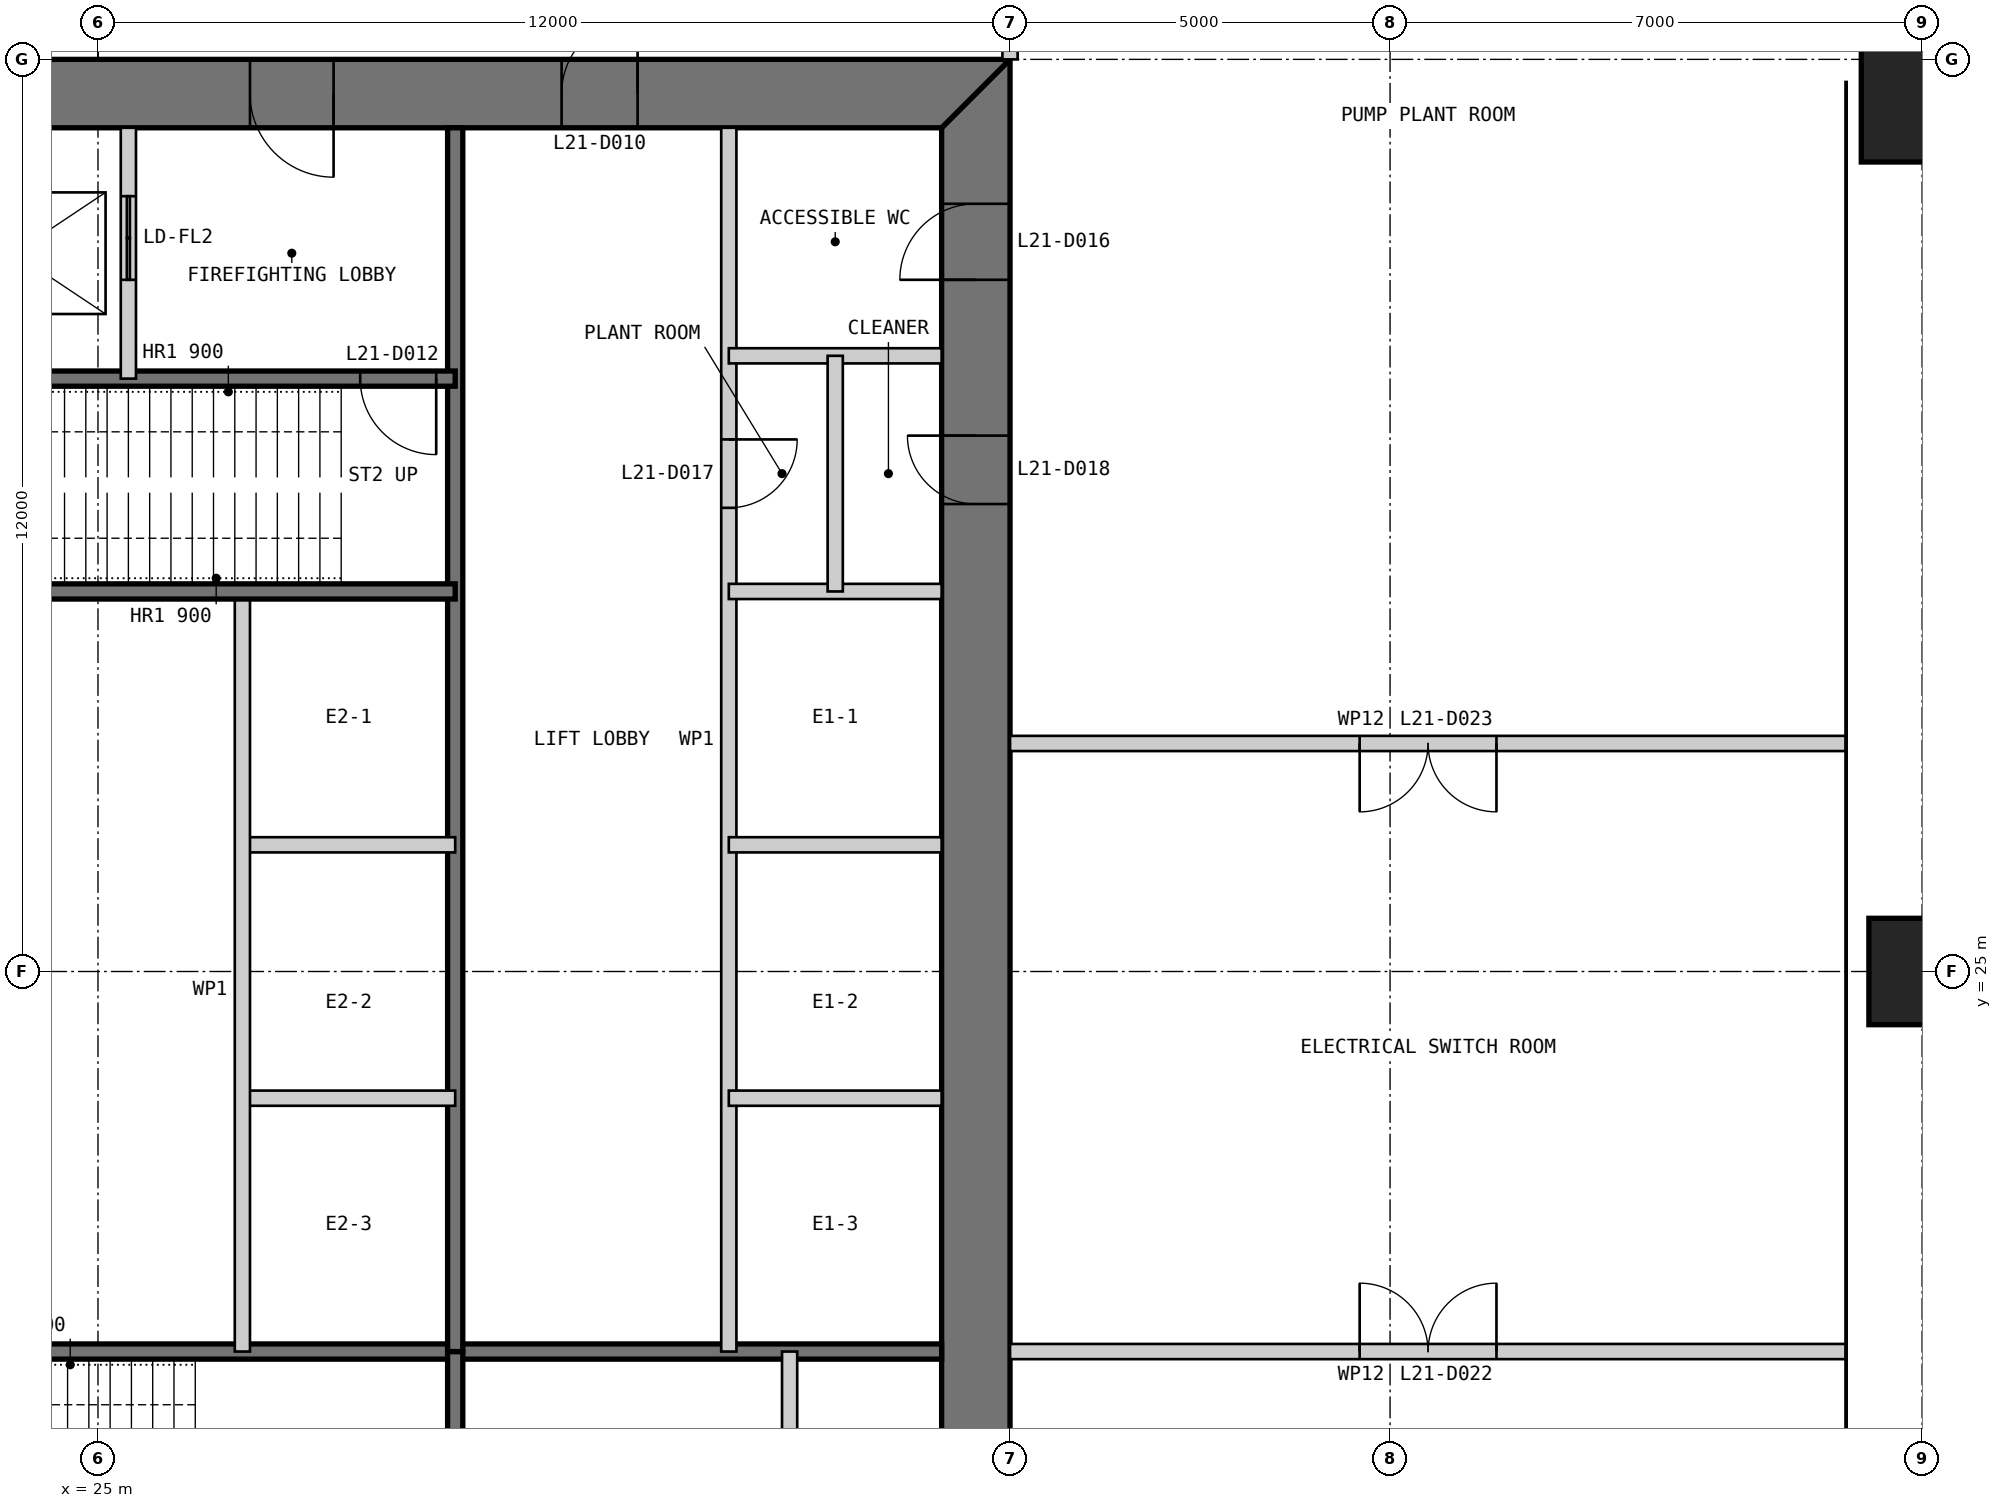
"""IFC4 building model, lengths in metres.
Left out: names, types, materials, properties, quantities, classifications, styles, units other than length and angle.
Written with IfcOpenShell. Run it as: python <this file> out.ifc"""

import sys

from ifc_helpers import new_model, si_unit, direction, frame, frame_2d, origin, origin_2d, place, context, subcontext, project, spatial, polyline, rectangle, outline, extrude, element, fill, save


model = new_model("IFC4")
c1 = context("Model", 3, precision=1e-05, world=origin(), true_north=direction((0.0, 1.0)))
c2 = subcontext(c1, "Body", "Model", "MODEL_VIEW")
j1 = project(units=[si_unit("LENGTHUNIT", "METRE"), si_unit("PLANEANGLEUNIT", "RADIAN")], contexts=[c1])
p1 = place(None, origin())
s1 = spatial("IfcSite", under=j1, at=p1, CompositionType="ELEMENT")
p2 = place(p1, origin())
s2 = spatial("IfcBuilding", under=s1, at=p2, CompositionType="ELEMENT")
p3 = place(p2, frame((0.0, 0.0, 91.0)))
s3 = spatial("IfcBuildingStorey", under=s2, at=p3, CompositionType="ELEMENT", Elevation=91.0)
p4 = place(p3, frame((49.0, 25.0, 0.0), z_axis=(0.0, 0.0, 1.0), x_axis=(1.0, 0.0, 0.0)))
e1 = element("IfcColumn", 1, at=p4, inside=s3, PredefinedType="COLUMN", context=c2, shape_type="SweptSolid", body=[
    extrude(rectangle(XDim=1.4, YDim=1.4, at=origin_2d()), origin(), (0.0, 0.0, 1.0), 6.0),
])
p5 = place(p3, frame((49.0, 37.0, 0.0), z_axis=(0.0, 0.0, 1.0), x_axis=(1.0, 0.0, 0.0)))
e2 = element("IfcColumn", 2, at=p5, inside=s3, PredefinedType="COLUMN", context=c2, shape_type="SweptSolid", body=[
    extrude(rectangle(XDim=1.6, YDim=2.7, at=origin_2d()), origin(), (0.0, 0.0, 1.0), 6.0),
])
p6 = place(p3, frame((36.55, 13.9, 0.0), z_axis=(0.0, 0.0, 1.0), x_axis=(0.0, 1.0, 0.0)))
e3 = element("IfcWall", 3, at=p6, inside=s3, PredefinedType="SHEAR", context=c2, shape_type="SweptSolid", body=[
    extrude(outline(polyline([(-0.9, -0.45), (23.1, -0.45), (22.2, 0.45), (0.0, 0.45), (-0.9, -0.45)])), origin(), (0.0, 0.0, 1.0), 6.0),
])
p7 = place(p6, frame((20.2, 0.0, 0.0)))
e4 = element("IfcOpeningElement", 4, at=p7, cuts=e3, PredefinedType="OPENING", context=c2, shape_type="SweptSolid", body=[
    extrude(rectangle(XDim=1.0, YDim=2.2, at=frame_2d((0.5, 1.1))), frame((0.0, 0.46, 0.0), z_axis=(0.0, -1.0, 0.0), x_axis=(1.0, 0.0, 0.0)), (0.0, 0.0, 1.0), 0.92),
])
p8 = place(p6, frame((17.25, 0.0, 0.0)))
e5 = element("IfcOpeningElement", 5, at=p8, cuts=e3, PredefinedType="OPENING", context=c2, shape_type="SweptSolid", body=[
    extrude(rectangle(XDim=0.9, YDim=2.2, at=frame_2d((0.45, 1.1))), frame((0.0, 0.46, 0.0), z_axis=(0.0, -1.0, 0.0), x_axis=(1.0, 0.0, 0.0)), (0.0, 0.0, 1.0), 0.92),
])
p9 = place(p3, frame((37.0, 36.55, 0.0), z_axis=(0.0, 0.0, 1.0), x_axis=(-1.0, 0.0, 0.0)))
e6 = element("IfcWall", 6, at=p9, inside=s3, PredefinedType="SHEAR", context=c2, shape_type="SweptSolid", body=[
    extrude(outline(polyline([(0.0, -0.45), (24.0, -0.45), (23.1, 0.45), (0.9, 0.45), (0.0, -0.45)])), origin(), (0.0, 0.0, 1.0), 6.0),
])
p10 = place(p9, frame((4.9, 0.0, 0.0)))
e7 = element("IfcOpeningElement", 7, at=p10, cuts=e6, PredefinedType="OPENING", context=c2, shape_type="SweptSolid", body=[
    extrude(rectangle(XDim=1.0, YDim=2.2, at=frame_2d((0.5, 1.1))), frame((0.0, 0.46, 0.0), z_axis=(0.0, -1.0, 0.0), x_axis=(1.0, 0.0, 0.0)), (0.0, 0.0, 1.0), 0.92),
])
p11 = place(p9, frame((8.9, 0.0, 0.0)))
e8 = element("IfcOpeningElement", 8, at=p11, cuts=e6, PredefinedType="OPENING", context=c2, shape_type="SweptSolid", body=[
    extrude(rectangle(XDim=1.1, YDim=2.2, at=frame_2d((0.55, 1.1))), frame((0.0, 0.46, 0.0), z_axis=(0.0, -1.0, 0.0), x_axis=(1.0, 0.0, 0.0)), (0.0, 0.0, 1.0), 0.92),
])
p12 = place(p9, frame((15.05, 0.0, 0.0)))
e9 = element("IfcOpeningElement", 9, at=p12, cuts=e6, PredefinedType="OPENING", context=c2, shape_type="SweptSolid", body=[
    extrude(rectangle(XDim=0.9, YDim=2.2, at=frame_2d((0.45, 1.1))), frame((0.0, 0.46, 0.0), z_axis=(0.0, -1.0, 0.0), x_axis=(1.0, 0.0, 0.0)), (0.0, 0.0, 1.0), 0.92),
])
p13 = place(p9, frame((17.9, 0.0, 0.0)))
e10 = element("IfcOpeningElement", 10, at=p13, cuts=e6, PredefinedType="OPENING", context=c2, shape_type="SweptSolid", body=[
    extrude(rectangle(XDim=1.0, YDim=2.2, at=frame_2d((0.5, 1.1))), frame((0.0, 0.46, 0.0), z_axis=(0.0, -1.0, 0.0), x_axis=(1.0, 0.0, 0.0)), (0.0, 0.0, 1.0), 0.92),
])
p14 = place(p9, frame((21.4, 0.0, 0.0)))
e11 = element("IfcOpeningElement", 11, at=p14, cuts=e6, PredefinedType="OPENING", context=c2, shape_type="SweptSolid", body=[
    extrude(rectangle(XDim=1.0, YDim=2.2, at=frame_2d((0.5, 1.1))), frame((0.0, 0.46, 0.0), z_axis=(0.0, -1.0, 0.0), x_axis=(1.0, 0.0, 0.0)), (0.0, 0.0, 1.0), 0.92),
])
p15 = place(p3, frame((20.3, 20.0, 0.0), z_axis=(0.0, 0.0, 1.0), x_axis=(1.0, 0.0, 0.0)))
e12 = element("IfcWall", 12, at=p15, inside=s3, PredefinedType="SOLIDWALL", context=c2, shape_type="SweptSolid", body=[
    extrude(rectangle(XDim=15.8, YDim=0.2, at=frame_2d((7.9, 0.0))), origin(), (0.0, 0.0, 1.0), 5.8),
])
p16 = place(p3, frame((29.7, 13.9, 0.0), z_axis=(0.0, 0.0, 1.0), x_axis=(0.0, 1.0, 0.0)))
e13 = element("IfcWall", 13, at=p16, inside=s3, PredefinedType="SOLIDWALL", context=c2, shape_type="SweptSolid", body=[
    extrude(rectangle(XDim=6.1, YDim=0.2, at=frame_2d((3.05, 0.0))), origin(), (0.0, 0.0, 1.0), 5.8),
])
p17 = place(p3, frame((34.1, 13.9, 0.0), z_axis=(0.0, 0.0, 1.0), x_axis=(0.0, 1.0, 0.0)))
e14 = element("IfcWall", 14, at=p17, inside=s3, PredefinedType="PARTITIONING", context=c2, shape_type="SweptSolid", body=[
    extrude(rectangle(XDim=6.1, YDim=0.2, at=frame_2d((3.05, 0.0))), origin(), (0.0, 0.0, 1.0), 5.8),
])
p18 = place(p3, frame((33.3, 36.1, 0.0), z_axis=(0.0, 0.0, 1.0), x_axis=(0.0, -1.0, 0.0)))
e15 = element("IfcWall", 15, at=p18, inside=s3, PredefinedType="PARTITIONING", context=c2, shape_type="SweptSolid", body=[
    extrude(rectangle(XDim=16.1, YDim=0.2, at=frame_2d((8.05, 0.0))), origin(), (0.0, 0.0, 1.0), 5.8),
])
p19 = place(p18, frame((4.1, 0.0, 0.0)))
e16 = element("IfcOpeningElement", 16, at=p19, cuts=e15, PredefinedType="OPENING", context=c2, shape_type="SweptSolid", body=[
    extrude(rectangle(XDim=0.9, YDim=2.2, at=frame_2d((0.45, 1.1))), frame((0.0, 0.11, 0.0), z_axis=(0.0, -1.0, 0.0), x_axis=(1.0, 0.0, 0.0)), (0.0, 0.0, 1.0), 0.22),
])
p20 = place(p3, frame((29.7, 36.1, 0.0), z_axis=(0.0, 0.0, 1.0), x_axis=(0.0, -1.0, 0.0)))
e17 = element("IfcWall", 17, at=p20, inside=s3, PredefinedType="SOLIDWALL", context=c2, shape_type="SweptSolid", body=[
    extrude(rectangle(XDim=16.1, YDim=0.2, at=frame_2d((8.05, 0.0))), origin(), (0.0, 0.0, 1.0), 5.8),
])
for number, where, z_axis, x_axis in (
    (18, (36.1, 30.0, 0.0), (0.0, 0.0, 1.0), (-1.0, 0.0, 0.0)),
    (19, (36.1, 26.667, 0.0), (0.0, 0.0, 1.0), (-1.0, 0.0, 0.0)),
    (20, (36.1, 23.333, 0.0), (0.0, 0.0, 1.0), (-1.0, 0.0, 0.0)),
    (21, (29.7, 26.667, 0.0), (0.0, 0.0, 1.0), (-1.0, 0.0, 0.0)),
    (22, (29.7, 23.333, 0.0), (0.0, 0.0, 1.0), (-1.0, 0.0, 0.0)),
):
    element("IfcWall", number, at=place(p3, frame(where, z_axis=z_axis, x_axis=x_axis)), inside=s3, PredefinedType="PARTITIONING", context=c2, shape_type="SweptSolid", body=[
        extrude(rectangle(XDim=2.8, YDim=0.2, at=frame_2d((1.4, 0.0))), origin(), (0.0, 0.0, 1.0), 5.8),
    ])
p21 = place(p3, frame((26.9, 30.0, 0.0), z_axis=(0.0, 0.0, 1.0), x_axis=(0.0, -1.0, 0.0)))
e23 = element("IfcWall", 23, at=p21, inside=s3, PredefinedType="PARTITIONING", context=c2, shape_type="SweptSolid", body=[
    extrude(rectangle(XDim=10.0, YDim=0.2, at=frame_2d((5.0, 0.0))), origin(), (0.0, 0.0, 1.0), 5.8),
])
p22 = place(p3, frame((29.7, 32.8, 0.0), z_axis=(0.0, 0.0, 1.0), x_axis=(-1.0, 0.0, 0.0)))
e24 = element("IfcWall", 24, at=p22, inside=s3, PredefinedType="SOLIDWALL", context=c2, shape_type="SweptSolid", body=[
    extrude(rectangle(XDim=9.4, YDim=0.2, at=frame_2d((4.7, 0.0))), origin(), (0.0, 0.0, 1.0), 5.8),
])
p23 = place(p22, frame((0.25, 0.0, 0.0)))
e25 = element("IfcOpeningElement", 25, at=p23, cuts=e24, PredefinedType="OPENING", context=c2, shape_type="SweptSolid", body=[
    extrude(rectangle(XDim=1.0, YDim=2.2, at=frame_2d((0.5, 1.1))), frame((0.0, 0.11, 0.0), z_axis=(0.0, -1.0, 0.0), x_axis=(1.0, 0.0, 0.0)), (0.0, 0.0, 1.0), 0.22),
])
p24 = place(p3, frame((29.7, 30.0, 0.0), z_axis=(0.0, 0.0, 1.0), x_axis=(-1.0, 0.0, 0.0)))
e26 = element("IfcWall", 26, at=p24, inside=s3, PredefinedType="SOLIDWALL", context=c2, shape_type="SweptSolid", body=[
    extrude(rectangle(XDim=15.8, YDim=0.2, at=frame_2d((7.9, 0.0))), origin(), (0.0, 0.0, 1.0), 5.8),
])
p25 = place(p3, frame((25.4, 36.1, 0.0), z_axis=(0.0, 0.0, 1.0), x_axis=(0.0, -1.0, 0.0)))
e27 = element("IfcWall", 27, at=p25, inside=s3, PredefinedType="PARTITIONING", context=c2, shape_type="SweptSolid", body=[
    extrude(rectangle(XDim=3.3, YDim=0.2, at=frame_2d((1.65, 0.0))), origin(), (0.0, 0.0, 1.0), 5.8),
])
p26 = place(p25, frame((0.9, 0.0, 0.0)))
e28 = element("IfcOpeningElement", 28, at=p26, cuts=e27, PredefinedType="OPENING", context=c2, shape_type="SweptSolid", body=[
    extrude(rectangle(XDim=1.1, YDim=2.2, at=frame_2d((0.55, 1.1))), frame((0.0, 0.11, 0.0), z_axis=(0.0, -1.0, 0.0), x_axis=(1.0, 0.0, 0.0)), (0.0, 0.0, 1.0), 0.22),
])
p27 = place(p3, frame((36.1, 33.1, 0.0), z_axis=(0.0, 0.0, 1.0), x_axis=(-1.0, 0.0, 0.0)))
e29 = element("IfcWall", 29, at=p27, inside=s3, PredefinedType="PARTITIONING", context=c2, shape_type="SweptSolid", body=[
    extrude(rectangle(XDim=2.8, YDim=0.2, at=frame_2d((1.4, 0.0))), origin(), (0.0, 0.0, 1.0), 5.8),
])
p28 = place(p3, frame((34.7, 33.1, 0.0), z_axis=(0.0, 0.0, 1.0), x_axis=(0.0, -1.0, 0.0)))
e30 = element("IfcWall", 30, at=p28, inside=s3, PredefinedType="PARTITIONING", context=c2, shape_type="SweptSolid", body=[
    extrude(rectangle(XDim=3.1, YDim=0.2, at=frame_2d((1.55, 0.0))), origin(), (0.0, 0.0, 1.0), 5.8),
])
p29 = place(p3, frame((37.0, 46.0, 0.0), z_axis=(0.0, 0.0, 1.0), x_axis=(0.0, -1.0, 0.0)))
e31 = element("IfcWall", 31, at=p29, inside=s3, PredefinedType="PARTITIONING", context=c2, shape_type="SweptSolid", body=[
    extrude(rectangle(XDim=9.0, YDim=0.2, at=frame_2d((4.5, 0.0))), origin(), (0.0, 0.0, 1.0), 4.853),
])
p30 = place(p3, frame((37.0, 20.0, 0.0), z_axis=(0.0, 0.0, 1.0), x_axis=(1.0, 0.0, 0.0)))
e32 = element("IfcWall", 32, at=p30, inside=s3, PredefinedType="PARTITIONING", context=c2, shape_type="SweptSolid", body=[
    extrude(rectangle(XDim=11.0, YDim=0.2, at=frame_2d((5.5, 0.0))), origin(), (0.0, 0.0, 1.0), 5.8),
])
p31 = place(p30, frame((4.6, 0.0, 0.0)))
e33 = element("IfcOpeningElement", 33, at=p31, cuts=e32, PredefinedType="OPENING", context=c2, shape_type="SweptSolid", body=[
    extrude(rectangle(XDim=1.8, YDim=2.4, at=frame_2d((0.9, 1.2))), frame((0.0, 0.11, 0.0), z_axis=(0.0, -1.0, 0.0), x_axis=(1.0, 0.0, 0.0)), (0.0, 0.0, 1.0), 0.22),
])
p32 = place(p3, frame((37.0, 28.0, 0.0), z_axis=(0.0, 0.0, 1.0), x_axis=(1.0, 0.0, 0.0)))
e34 = element("IfcWall", 34, at=p32, inside=s3, PredefinedType="PARTITIONING", context=c2, shape_type="SweptSolid", body=[
    extrude(rectangle(XDim=11.0, YDim=0.2, at=frame_2d((5.5, 0.0))), origin(), (0.0, 0.0, 1.0), 5.8),
])
p33 = place(p32, frame((4.6, 0.0, 0.0)))
e35 = element("IfcOpeningElement", 35, at=p33, cuts=e34, PredefinedType="OPENING", context=c2, shape_type="SweptSolid", body=[
    extrude(rectangle(XDim=1.8, YDim=2.4, at=frame_2d((0.9, 1.2))), frame((0.0, 0.11, 0.0), z_axis=(0.0, -1.0, 0.0), x_axis=(1.0, 0.0, 0.0)), (0.0, 0.0, 1.0), 0.22),
])
p34 = place(p10, frame((1.0, 0.0, 0.0), z_axis=(0.0, 0.0, 1.0), x_axis=(-1.0, 0.0, 0.0)))
e36 = element("IfcDoor", 36, at=p34, inside=s3, OperationType="SINGLE_SWING_RIGHT", PredefinedType="DOOR", context=c2, shape_type="SweptSolid", body=[
    extrude(rectangle(XDim=1.0, YDim=2.2, at=frame_2d((0.5, 1.1))), frame((0.0, 0.025, 0.0), z_axis=(0.0, -1.0, 0.0), x_axis=(1.0, 0.0, 0.0)), (0.0, 0.0, 1.0), 0.05),
    extrude(outline(polyline([(0.0, 0.0), (0.04, 0.0), (0.04, 2.16), (0.96, 2.16), (0.96, 0.0), (1.0, 0.0), (1.0, 2.2), (0.0, 2.2), (0.0, 0.0)])), frame((0.0, 0.3, 0.0), z_axis=(0.0, -1.0, 0.0), x_axis=(1.0, 0.0, 0.0)), (0.0, 0.0, 1.0), 0.6),
])
fill(e7, e36)
p35 = place(p11, origin())
e37 = element("IfcDoor", 37, at=p35, inside=s3, OperationType="SINGLE_SWING_LEFT", PredefinedType="DOOR", context=c2, shape_type="SweptSolid", body=[
    extrude(rectangle(XDim=1.1, YDim=2.2, at=frame_2d((0.55, 1.1))), frame((0.0, 0.025, 0.0), z_axis=(0.0, -1.0, 0.0), x_axis=(1.0, 0.0, 0.0)), (0.0, 0.0, 1.0), 0.05),
    extrude(outline(polyline([(0.0, 0.0), (0.04, 0.0), (0.04, 2.16), (1.06, 2.16), (1.06, 0.0), (1.1, 0.0), (1.1, 2.2), (0.0, 2.2), (0.0, 0.0)])), frame((0.0, 0.3, 0.0), z_axis=(0.0, -1.0, 0.0), x_axis=(1.0, 0.0, 0.0)), (0.0, 0.0, 1.0), 0.6),
])
fill(e8, e37)
p36 = place(p23, origin())
e38 = element("IfcDoor", 38, at=p36, inside=s3, OperationType="SINGLE_SWING_LEFT", PredefinedType="DOOR", context=c2, shape_type="SweptSolid", body=[
    extrude(rectangle(XDim=1.0, YDim=2.2, at=frame_2d((0.5, 1.1))), frame((0.0, 0.025, 0.0), z_axis=(0.0, -1.0, 0.0), x_axis=(1.0, 0.0, 0.0)), (0.0, 0.0, 1.0), 0.05),
])
fill(e25, e38)
p37 = place(p7, origin())
e39 = element("IfcDoor", 39, at=p37, inside=s3, OperationType="SINGLE_SWING_LEFT", PredefinedType="DOOR", context=c2, shape_type="SweptSolid", body=[
    extrude(rectangle(XDim=1.0, YDim=2.2, at=frame_2d((0.5, 1.1))), frame((0.0, 0.025, 0.0), z_axis=(0.0, -1.0, 0.0), x_axis=(1.0, 0.0, 0.0)), (0.0, 0.0, 1.0), 0.05),
    extrude(outline(polyline([(0.0, 0.0), (0.04, 0.0), (0.04, 2.16), (0.96, 2.16), (0.96, 0.0), (1.0, 0.0), (1.0, 2.2), (0.0, 2.2), (0.0, 0.0)])), frame((0.0, 0.3, 0.0), z_axis=(0.0, -1.0, 0.0), x_axis=(1.0, 0.0, 0.0)), (0.0, 0.0, 1.0), 0.6),
])
fill(e4, e39)
p38 = place(p19, origin())
e40 = element("IfcDoor", 40, at=p38, inside=s3, OperationType="SINGLE_SWING_LEFT", PredefinedType="DOOR", context=c2, shape_type="SweptSolid", body=[
    extrude(rectangle(XDim=0.9, YDim=2.2, at=frame_2d((0.45, 1.1))), frame((0.0, 0.025, 0.0), z_axis=(0.0, -1.0, 0.0), x_axis=(1.0, 0.0, 0.0)), (0.0, 0.0, 1.0), 0.05),
])
fill(e16, e40)
p39 = place(p8, origin())
e41 = element("IfcDoor", 41, at=p39, inside=s3, OperationType="SINGLE_SWING_RIGHT", PredefinedType="DOOR", context=c2, shape_type="SweptSolid", body=[
    extrude(rectangle(XDim=0.9, YDim=2.2, at=frame_2d((0.45, 1.1))), frame((0.0, 0.025, 0.0), z_axis=(0.0, -1.0, 0.0), x_axis=(1.0, 0.0, 0.0)), (0.0, 0.0, 1.0), 0.05),
    extrude(outline(polyline([(0.0, 0.0), (0.04, 0.0), (0.04, 2.16), (0.86, 2.16), (0.86, 0.0), (0.9, 0.0), (0.9, 2.2), (0.0, 2.2), (0.0, 0.0)])), frame((0.0, 0.3, 0.0), z_axis=(0.0, -1.0, 0.0), x_axis=(1.0, 0.0, 0.0)), (0.0, 0.0, 1.0), 0.6),
])
fill(e5, e41)
p40 = place(p31, origin())
e42 = element("IfcDoor", 42, at=p40, inside=s3, OperationType="DOUBLE_DOOR_SINGLE_SWING", PredefinedType="DOOR", context=c2, shape_type="SweptSolid", body=[
    extrude(rectangle(XDim=1.8, YDim=2.4, at=frame_2d((0.9, 1.2))), frame((0.0, 0.025, 0.0), z_axis=(0.0, -1.0, 0.0), x_axis=(1.0, 0.0, 0.0)), (0.0, 0.0, 1.0), 0.05),
])
fill(e33, e42)
p41 = place(p33, frame((1.8, 0.0, 0.0), z_axis=(0.0, 0.0, 1.0), x_axis=(-1.0, 0.0, 0.0)))
e43 = element("IfcDoor", 43, at=p41, inside=s3, OperationType="DOUBLE_DOOR_SINGLE_SWING", PredefinedType="DOOR", context=c2, shape_type="SweptSolid", body=[
    extrude(rectangle(XDim=1.8, YDim=2.4, at=frame_2d((0.9, 1.2))), frame((0.0, 0.025, 0.0), z_axis=(0.0, -1.0, 0.0), x_axis=(1.0, 0.0, 0.0)), (0.0, 0.0, 1.0), 0.05),
])
fill(e35, e43)
p42 = place(p26, origin())
e44 = element("IfcDoor", 44, at=p42, inside=s3, OperationType="DOUBLE_DOOR_SLIDING", PredefinedType="DOOR", context=c2, shape_type="SweptSolid", body=[
    extrude(rectangle(XDim=1.1, YDim=2.2, at=frame_2d((0.55, 1.1))), frame((0.0, 0.025, 0.0), z_axis=(0.0, -1.0, 0.0), x_axis=(1.0, 0.0, 0.0)), (0.0, 0.0, 1.0), 0.05),
])
fill(e28, e44)
save(model, sys.argv[1])
